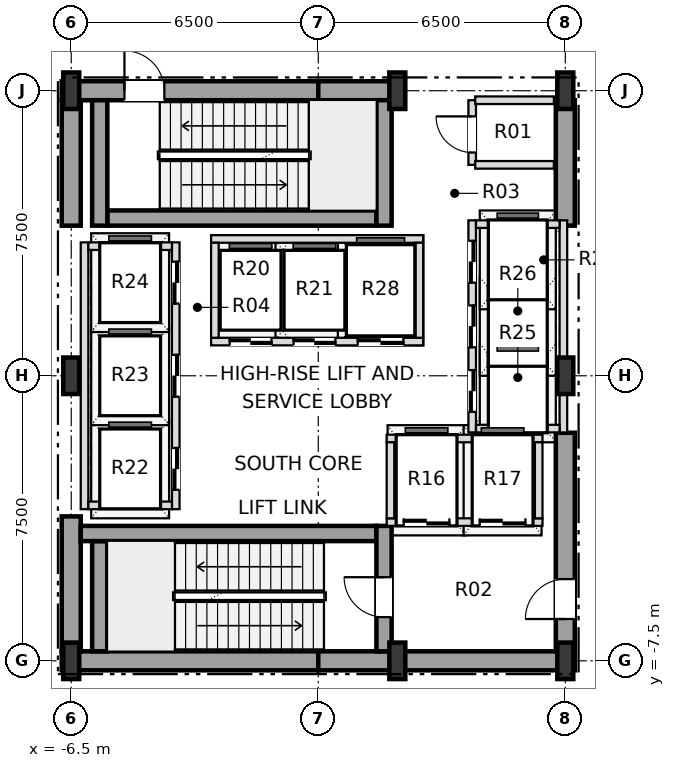
"""IFC4 building model, lengths in metres.
Left out: names, types, materials, properties, quantities, classifications, styles, units other than length and angle.
Written with IfcOpenShell. Run it as: python <this file> out.ifc"""

import sys

from ifc_helpers import new_model, si_unit, direction, frame, frame_2d, origin, origin_2d, place, context, subcontext, project, spatial, rectangle, i_section, extrude, element, fill, save


model = new_model("IFC4")
c1 = context("Model", 3, precision=1e-05, world=origin(), true_north=direction((0.0, 1.0)))
c2 = subcontext(c1, "Body", "Model", "MODEL_VIEW")
j1 = project(units=[si_unit("LENGTHUNIT", "METRE"), si_unit("PLANEANGLEUNIT", "RADIAN")], contexts=[c1])
p1 = place(None, origin())
s1 = spatial("IfcSite", under=j1, at=p1, CompositionType="ELEMENT")
p2 = place(p1, origin())
s2 = spatial("IfcBuilding", under=s1, at=p2, CompositionType="ELEMENT")
p3 = place(p2, frame((0.0, 0.0, 6.0)))
s3 = spatial("IfcBuildingStorey", under=s2, at=p3, CompositionType="ELEMENT", Elevation=6.0)
for number, where, z_axis, x_axis in (
    (1, (-6.5, -7.5, 0.0), (0.0, 0.0, 1.0), (1.0, 0.0, 0.0)),
    (2, (2.08, -7.5, 0.0), (0.0, 0.0, 1.0), (1.0, 0.0, 0.0)),
    (3, (6.5, -7.5, 0.0), (0.0, 0.0, 1.0), (1.0, 0.0, 0.0)),
    (4, (-6.5, 0.0, 0.0), (0.0, 0.0, 1.0), (1.0, 0.0, 0.0)),
    (5, (6.5, 0.0, 0.0), (0.0, 0.0, 1.0), (1.0, 0.0, 0.0)),
    (6, (-6.5, 7.5, 0.0), (0.0, 0.0, 1.0), (1.0, 0.0, 0.0)),
    (7, (2.08, 7.5, 0.0), (0.0, 0.0, 1.0), (1.0, 0.0, 0.0)),
    (8, (6.5, 7.5, 0.0), (0.0, 0.0, 1.0), (1.0, 0.0, 0.0)),
):
    element("IfcColumn", number, at=place(p3, frame(where, z_axis=z_axis, x_axis=x_axis)), inside=s3, PredefinedType="COLUMN", context=c2, shape_type="SweptSolid", body=[
        extrude(i_section(OverallWidth=0.42, OverallDepth=0.96, WebThickness=0.022, FlangeThickness=0.034, at=origin_2d()), origin(), (0.0, 0.0, 1.0), 5.4),
    ])
for number, where, z_axis, x_axis in (
    (9, (-6.75, -7.5, 0.0), (0.0, 0.0, 1.0), (1.0, 0.0, 0.0)),
    (10, (0.0, -7.5, 0.0), (0.0, 0.0, 1.0), (1.0, 0.0, 0.0)),
):
    element("IfcWall", number, at=place(p3, frame(where, z_axis=z_axis, x_axis=x_axis)), inside=s3, PredefinedType="SHEAR", context=c2, shape_type="SweptSolid", body=[
        extrude(rectangle(XDim=6.75, YDim=0.5, at=frame_2d((3.375, 0.0))), origin(), (0.0, 0.0, 1.0), 5.12),
    ])
p4 = place(p3, frame((-6.75, 7.5, 0.0), z_axis=(0.0, 0.0, 1.0), x_axis=(1.0, 0.0, 0.0)))
e11 = element("IfcWall", 11, at=p4, inside=s3, PredefinedType="SHEAR", context=c2, shape_type="SweptSolid", body=[
    extrude(rectangle(XDim=6.75, YDim=0.5, at=frame_2d((3.375, 0.0))), origin(), (0.0, 0.0, 1.0), 5.12),
])
p5 = place(p4, frame((1.65, 0.0, 0.0)))
e12 = element("IfcOpeningElement", 12, at=p5, cuts=e11, PredefinedType="OPENING", context=c2, shape_type="SweptSolid", body=[
    extrude(rectangle(XDim=1.05, YDim=2.15, at=frame_2d((0.525, 1.075))), frame((0.0, 0.26, 0.0), z_axis=(0.0, -1.0, 0.0), x_axis=(1.0, 0.0, 0.0)), (0.0, 0.0, 1.0), 0.52),
])
p6 = place(p3, frame((0.0, 7.5, 0.0), z_axis=(0.0, 0.0, 1.0), x_axis=(1.0, 0.0, 0.0)))
e13 = element("IfcWall", 13, at=p6, inside=s3, PredefinedType="SHEAR", context=c2, shape_type="SweptSolid", body=[
    extrude(rectangle(XDim=2.08, YDim=0.5, at=frame_2d((1.04, 0.0))), origin(), (0.0, 0.0, 1.0), 5.12),
])
p7 = place(p3, frame((-6.5, -7.25, 0.0), z_axis=(0.0, 0.0, 1.0), x_axis=(0.0, 1.0, 0.0)))
e14 = element("IfcWall", 14, at=p7, inside=s3, PredefinedType="SHEAR", context=c2, shape_type="SweptSolid", body=[
    extrude(rectangle(XDim=3.55, YDim=0.5, at=frame_2d((1.775, 0.0))), origin(), (0.0, 0.0, 1.0), 5.12),
])
p8 = place(p3, frame((-6.5, 3.95, 0.0), z_axis=(0.0, 0.0, 1.0), x_axis=(0.0, 1.0, 0.0)))
e15 = element("IfcWall", 15, at=p8, inside=s3, PredefinedType="SHEAR", context=c2, shape_type="SweptSolid", body=[
    extrude(rectangle(XDim=3.3, YDim=0.5, at=frame_2d((1.65, 0.0))), origin(), (0.0, 0.0, 1.0), 5.12),
])
p9 = place(p3, frame((6.5, -7.25, 0.0), z_axis=(0.0, 0.0, 1.0), x_axis=(0.0, 1.0, 0.0)))
e16 = element("IfcWall", 16, at=p9, inside=s3, PredefinedType="SHEAR", context=c2, shape_type="SweptSolid", body=[
    extrude(rectangle(XDim=5.75, YDim=0.5, at=frame_2d((2.875, 0.0))), origin(), (0.0, 0.0, 1.0), 5.12),
])
p10 = place(p9, frame((0.85, 0.0, 0.0)))
e17 = element("IfcOpeningElement", 17, at=p10, cuts=e16, PredefinedType="OPENING", context=c2, shape_type="SweptSolid", body=[
    extrude(rectangle(XDim=1.05, YDim=2.15, at=frame_2d((0.525, 1.075))), frame((0.0, 0.26, 0.0), z_axis=(0.0, -1.0, 0.0), x_axis=(1.0, 0.0, 0.0)), (0.0, 0.0, 1.0), 0.52),
])
p11 = place(p3, frame((6.5, 3.95, 0.0), z_axis=(0.0, 0.0, 1.0), x_axis=(0.0, 1.0, 0.0)))
e18 = element("IfcWall", 18, at=p11, inside=s3, PredefinedType="SHEAR", context=c2, shape_type="SweptSolid", body=[
    extrude(rectangle(XDim=3.3, YDim=0.5, at=frame_2d((1.65, 0.0))), origin(), (0.0, 0.0, 1.0), 5.12),
])
p12 = place(p3, frame((-5.75, -7.25, 0.0), z_axis=(0.0, 0.0, 1.0), x_axis=(0.0, 1.0, 0.0)))
e19 = element("IfcWall", 19, at=p12, inside=s3, PredefinedType="SHEAR", context=c2, shape_type="SweptSolid", body=[
    extrude(rectangle(XDim=2.9, YDim=0.4, at=frame_2d((1.45, 0.0))), origin(), (0.0, 0.0, 1.0), 5.12),
])
p13 = place(p3, frame((-6.25, -4.15, 0.0), z_axis=(0.0, 0.0, 1.0), x_axis=(1.0, 0.0, 0.0)))
e20 = element("IfcWall", 20, at=p13, inside=s3, PredefinedType="SHEAR", context=c2, shape_type="SweptSolid", body=[
    extrude(rectangle(XDim=7.78, YDim=0.4, at=frame_2d((3.89, 0.0))), origin(), (0.0, 0.0, 1.0), 5.12),
])
p14 = place(p3, frame((1.73, -7.25, 0.0), z_axis=(0.0, 0.0, 1.0), x_axis=(0.0, 1.0, 0.0)))
e21 = element("IfcWall", 21, at=p14, inside=s3, PredefinedType="SHEAR", context=c2, shape_type="SweptSolid", body=[
    extrude(rectangle(XDim=3.3, YDim=0.4, at=frame_2d((1.65, 0.0))), origin(), (0.0, 0.0, 1.0), 5.12),
])
p15 = place(p14, frame((0.9, 0.0, 0.0)))
e22 = element("IfcOpeningElement", 22, at=p15, cuts=e21, PredefinedType="OPENING", context=c2, shape_type="SweptSolid", body=[
    extrude(rectangle(XDim=1.05, YDim=2.15, at=frame_2d((0.525, 1.075))), frame((0.0, 0.21, 0.0), z_axis=(0.0, -1.0, 0.0), x_axis=(1.0, 0.0, 0.0)), (0.0, 0.0, 1.0), 0.42),
])
p16 = place(p3, frame((-5.55, 4.15, 0.0), z_axis=(0.0, 0.0, 1.0), x_axis=(1.0, 0.0, 0.0)))
e23 = element("IfcWall", 23, at=p16, inside=s3, PredefinedType="SHEAR", context=c2, shape_type="SweptSolid", body=[
    extrude(rectangle(XDim=7.08, YDim=0.4, at=frame_2d((3.54, 0.0))), origin(), (0.0, 0.0, 1.0), 5.12),
])
for number, where, z_axis, x_axis in (
    (24, (1.73, 3.95, 0.0), (0.0, 0.0, 1.0), (0.0, 1.0, 0.0)),
    (25, (-5.75, 3.95, 0.0), (0.0, 0.0, 1.0), (0.0, 1.0, 0.0)),
):
    element("IfcWall", number, at=place(p3, frame(where, z_axis=z_axis, x_axis=x_axis)), inside=s3, PredefinedType="SHEAR", context=c2, shape_type="SweptSolid", body=[
        extrude(rectangle(XDim=3.3, YDim=0.4, at=frame_2d((1.65, 0.0))), origin(), (0.0, 0.0, 1.0), 5.12),
    ])
p17 = place(p3, frame((-3.75, -3.51, 0.0), z_axis=(0.0, 0.0, 1.0), x_axis=(0.0, 1.0, 0.0)))
e26 = element("IfcWall", 26, at=p17, inside=s3, PredefinedType="SOLIDWALL", context=c2, shape_type="SweptSolid", body=[
    extrude(rectangle(XDim=7.02, YDim=0.2, at=frame_2d((3.51, 0.0))), origin(), (0.0, 0.0, 1.0), 5.12),
])
p18 = place(p17, frame((0.51, 0.0, 0.0)))
e27 = element("IfcOpeningElement", 27, at=p18, cuts=e26, PredefinedType="OPENING", context=c2, shape_type="SweptSolid", body=[
    extrude(rectangle(XDim=1.1, YDim=2.15, at=frame_2d((0.55, 1.075))), frame((0.0, 0.11, 0.0), z_axis=(0.0, -1.0, 0.0), x_axis=(1.0, 0.0, 0.0)), (0.0, 0.0, 1.0), 0.22),
])
p19 = place(p17, frame((2.96, 0.0, 0.0)))
e28 = element("IfcOpeningElement", 28, at=p19, cuts=e26, PredefinedType="OPENING", context=c2, shape_type="SweptSolid", body=[
    extrude(rectangle(XDim=1.1, YDim=2.15, at=frame_2d((0.55, 1.075))), frame((0.0, 0.11, 0.0), z_axis=(0.0, -1.0, 0.0), x_axis=(1.0, 0.0, 0.0)), (0.0, 0.0, 1.0), 0.22),
])
p20 = place(p17, frame((5.41, 0.0, 0.0)))
e29 = element("IfcOpeningElement", 29, at=p20, cuts=e26, PredefinedType="OPENING", context=c2, shape_type="SweptSolid", body=[
    extrude(rectangle(XDim=1.1, YDim=2.15, at=frame_2d((0.55, 1.075))), frame((0.0, 0.11, 0.0), z_axis=(0.0, -1.0, 0.0), x_axis=(1.0, 0.0, 0.0)), (0.0, 0.0, 1.0), 0.22),
])
p21 = place(p3, frame((-6.15, -3.51, 0.0), z_axis=(0.0, 0.0, 1.0), x_axis=(0.0, 1.0, 0.0)))
e30 = element("IfcWall", 30, at=p21, inside=s3, PredefinedType="SOLIDWALL", context=c2, shape_type="SweptSolid", body=[
    extrude(rectangle(XDim=7.02, YDim=0.2, at=frame_2d((3.51, 0.0))), origin(), (0.0, 0.0, 1.0), 5.12),
])
for number, where, z_axis, x_axis in (
    (31, (-6.05, -3.41, 0.0), (0.0, 0.0, 1.0), (1.0, 0.0, 0.0)),
    (32, (-6.05, 3.41, 0.0), (0.0, 0.0, 1.0), (1.0, 0.0, 0.0)),
):
    element("IfcWall", number, at=place(p3, frame(where, z_axis=z_axis, x_axis=x_axis)), inside=s3, PredefinedType="SOLIDWALL", context=c2, shape_type="SweptSolid", body=[
        extrude(rectangle(XDim=2.2, YDim=0.2, at=frame_2d((1.1, 0.0))), origin(), (0.0, 0.0, 1.0), 5.12),
    ])
p22 = place(p3, frame((4.05, -1.49, 0.0), z_axis=(0.0, 0.0, 1.0), x_axis=(0.0, 1.0, 0.0)))
e33 = element("IfcWall", 33, at=p22, inside=s3, PredefinedType="SOLIDWALL", context=c2, shape_type="SweptSolid", body=[
    extrude(rectangle(XDim=5.58, YDim=0.2, at=frame_2d((2.79, 0.0))), origin(), (0.0, 0.0, 1.0), 5.12),
])
p23 = place(p22, frame((0.54, 0.0, 0.0)))
e34 = element("IfcOpeningElement", 34, at=p23, cuts=e33, PredefinedType="OPENING", context=c2, shape_type="SweptSolid", body=[
    extrude(rectangle(XDim=1.1, YDim=2.15, at=frame_2d((0.55, 1.075))), frame((0.0, 0.11, 0.0), z_axis=(0.0, -1.0, 0.0), x_axis=(1.0, 0.0, 0.0)), (0.0, 0.0, 1.0), 0.22),
])
p24 = place(p22, frame((2.24, 0.0, 0.0)))
e35 = element("IfcOpeningElement", 35, at=p24, cuts=e33, PredefinedType="OPENING", context=c2, shape_type="SweptSolid", body=[
    extrude(rectangle(XDim=1.1, YDim=2.15, at=frame_2d((0.55, 1.075))), frame((0.0, 0.11, 0.0), z_axis=(0.0, -1.0, 0.0), x_axis=(1.0, 0.0, 0.0)), (0.0, 0.0, 1.0), 0.22),
])
p25 = place(p22, frame((3.94, 0.0, 0.0)))
e36 = element("IfcOpeningElement", 36, at=p25, cuts=e33, PredefinedType="OPENING", context=c2, shape_type="SweptSolid", body=[
    extrude(rectangle(XDim=1.1, YDim=2.15, at=frame_2d((0.55, 1.075))), frame((0.0, 0.11, 0.0), z_axis=(0.0, -1.0, 0.0), x_axis=(1.0, 0.0, 0.0)), (0.0, 0.0, 1.0), 0.22),
])
p26 = place(p3, frame((6.45, -1.49, 0.0), z_axis=(0.0, 0.0, 1.0), x_axis=(0.0, 1.0, 0.0)))
e37 = element("IfcWall", 37, at=p26, inside=s3, PredefinedType="SOLIDWALL", context=c2, shape_type="SweptSolid", body=[
    extrude(rectangle(XDim=5.58, YDim=0.2, at=frame_2d((2.79, 0.0))), origin(), (0.0, 0.0, 1.0), 4.41),
])
for number, where, z_axis, x_axis in (
    (38, (4.15, -1.39, 0.0), (0.0, 0.0, 1.0), (1.0, 0.0, 0.0)),
    (39, (4.15, 3.99, 0.0), (0.0, 0.0, 1.0), (1.0, 0.0, 0.0)),
):
    element("IfcWall", number, at=place(p3, frame(where, z_axis=z_axis, x_axis=x_axis)), inside=s3, PredefinedType="SOLIDWALL", context=c2, shape_type="SweptSolid", body=[
        extrude(rectangle(XDim=2.2, YDim=0.2, at=frame_2d((1.1, 0.0))), origin(), (0.0, 0.0, 1.0), 5.12),
    ])
p27 = place(p3, frame((-2.82, 0.9, 0.0), z_axis=(0.0, 0.0, 1.0), x_axis=(1.0, 0.0, 0.0)))
e40 = element("IfcWall", 40, at=p27, inside=s3, PredefinedType="SOLIDWALL", context=c2, shape_type="SweptSolid", body=[
    extrude(rectangle(XDim=5.58, YDim=0.2, at=frame_2d((2.79, 0.0))), origin(), (0.0, 0.0, 1.0), 5.12),
])
p28 = place(p27, frame((0.49, 0.0, 0.0)))
e41 = element("IfcOpeningElement", 41, at=p28, cuts=e40, PredefinedType="OPENING", context=c2, shape_type="SweptSolid", body=[
    extrude(rectangle(XDim=1.1, YDim=2.15, at=frame_2d((0.55, 1.075))), frame((0.0, 0.11, 0.0), z_axis=(0.0, -1.0, 0.0), x_axis=(1.0, 0.0, 0.0)), (0.0, 0.0, 1.0), 0.22),
])
p29 = place(p27, frame((2.17, 0.0, 0.0)))
e42 = element("IfcOpeningElement", 42, at=p29, cuts=e40, PredefinedType="OPENING", context=c2, shape_type="SweptSolid", body=[
    extrude(rectangle(XDim=1.1, YDim=2.15, at=frame_2d((0.55, 1.075))), frame((0.0, 0.11, 0.0), z_axis=(0.0, -1.0, 0.0), x_axis=(1.0, 0.0, 0.0)), (0.0, 0.0, 1.0), 0.22),
])
p30 = place(p27, frame((3.86, 0.0, 0.0)))
e43 = element("IfcOpeningElement", 43, at=p30, cuts=e40, PredefinedType="OPENING", context=c2, shape_type="SweptSolid", body=[
    extrude(rectangle(XDim=1.2, YDim=2.2, at=frame_2d((0.6, 1.1))), frame((0.0, 0.11, 0.0), z_axis=(0.0, -1.0, 0.0), x_axis=(1.0, 0.0, 0.0)), (0.0, 0.0, 1.0), 0.22),
])
p31 = place(p3, frame((-2.82, 3.6, 0.0), z_axis=(0.0, 0.0, 1.0), x_axis=(1.0, 0.0, 0.0)))
e44 = element("IfcWall", 44, at=p31, inside=s3, PredefinedType="SOLIDWALL", context=c2, shape_type="SweptSolid", body=[
    extrude(rectangle(XDim=5.58, YDim=0.2, at=frame_2d((2.79, 0.0))), origin(), (0.0, 0.0, 1.0), 5.12),
])
for number, where, z_axis, x_axis in (
    (45, (-2.72, 1.0, 0.0), (0.0, 0.0, 1.0), (0.0, 1.0, 0.0)),
    (46, (2.66, 1.0, 0.0), (0.0, 0.0, 1.0), (0.0, 1.0, 0.0)),
):
    element("IfcWall", number, at=place(p3, frame(where, z_axis=z_axis, x_axis=x_axis)), inside=s3, PredefinedType="SOLIDWALL", context=c2, shape_type="SweptSolid", body=[
        extrude(rectangle(XDim=2.5, YDim=0.2, at=frame_2d((1.25, 0.0))), origin(), (0.0, 0.0, 1.0), 5.12),
    ])
p32 = place(p3, frame((1.8, -3.85, 0.0), z_axis=(0.0, 0.0, 1.0), x_axis=(1.0, 0.0, 0.0)))
e47 = element("IfcWall", 47, at=p32, inside=s3, PredefinedType="SOLIDWALL", context=c2, shape_type="SweptSolid", body=[
    extrude(rectangle(XDim=4.1, YDim=0.2, at=frame_2d((2.05, 0.0))), origin(), (0.0, 0.0, 1.0), 5.12),
])
p33 = place(p32, frame((0.45, 0.0, 0.0)))
e48 = element("IfcOpeningElement", 48, at=p33, cuts=e47, PredefinedType="OPENING", context=c2, shape_type="SweptSolid", body=[
    extrude(rectangle(XDim=1.2, YDim=2.2, at=frame_2d((0.6, 1.1))), frame((0.0, 0.11, 0.0), z_axis=(0.0, -1.0, 0.0), x_axis=(1.0, 0.0, 0.0)), (0.0, 0.0, 1.0), 0.22),
])
p34 = place(p32, frame((2.45, 0.0, 0.0)))
e49 = element("IfcOpeningElement", 49, at=p34, cuts=e47, PredefinedType="OPENING", context=c2, shape_type="SweptSolid", body=[
    extrude(rectangle(XDim=1.2, YDim=2.2, at=frame_2d((0.6, 1.1))), frame((0.0, 0.11, 0.0), z_axis=(0.0, -1.0, 0.0), x_axis=(1.0, 0.0, 0.0)), (0.0, 0.0, 1.0), 0.22),
])
p35 = place(p3, frame((1.8, -1.65, 0.0), z_axis=(0.0, 0.0, 1.0), x_axis=(1.0, 0.0, 0.0)))
e50 = element("IfcWall", 50, at=p35, inside=s3, PredefinedType="SOLIDWALL", context=c2, shape_type="SweptSolid", body=[
    extrude(rectangle(XDim=4.1, YDim=0.2, at=frame_2d((2.05, 0.0))), origin(), (0.0, 0.0, 1.0), 5.12),
])
for number, where, z_axis, x_axis in (
    (51, (1.9, -3.75, 0.0), (0.0, 0.0, 1.0), (0.0, 1.0, 0.0)),
    (52, (5.8, -3.75, 0.0), (0.0, 0.0, 1.0), (0.0, 1.0, 0.0)),
):
    element("IfcWall", number, at=place(p3, frame(where, z_axis=z_axis, x_axis=x_axis)), inside=s3, PredefinedType="SOLIDWALL", context=c2, shape_type="SweptSolid", body=[
        extrude(rectangle(XDim=2.0, YDim=0.2, at=frame_2d((1.0, 0.0))), origin(), (0.0, 0.0, 1.0), 5.12),
    ])
p36 = place(p3, frame((4.05, 5.55, 0.0), z_axis=(0.0, 0.0, 1.0), x_axis=(0.0, 1.0, 0.0)))
e53 = element("IfcWall", 53, at=p36, inside=s3, PredefinedType="SOLIDWALL", context=c2, shape_type="SweptSolid", body=[
    extrude(rectangle(XDim=1.7, YDim=0.2, at=frame_2d((0.85, 0.0))), origin(), (0.0, 0.0, 1.0), 5.12),
])
p37 = place(p36, frame((0.325, 0.0, 0.0)))
e54 = element("IfcOpeningElement", 54, at=p37, cuts=e53, PredefinedType="OPENING", context=c2, shape_type="SweptSolid", body=[
    extrude(rectangle(XDim=0.95, YDim=2.15, at=frame_2d((0.475, 1.075))), frame((0.0, 0.11, 0.0), z_axis=(0.0, -1.0, 0.0), x_axis=(1.0, 0.0, 0.0)), (0.0, 0.0, 1.0), 0.22),
])
p38 = place(p3, frame((4.13, 5.55, 0.0), z_axis=(0.0, 0.0, 1.0), x_axis=(1.0, 0.0, 0.0)))
e55 = element("IfcWall", 55, at=p38, inside=s3, PredefinedType="SOLIDWALL", context=c2, shape_type="SweptSolid", body=[
    extrude(rectangle(XDim=2.07, YDim=0.2, at=frame_2d((1.035, 0.0))), origin(), (0.0, 0.0, 1.0), 5.12),
])
p39 = place(p3, frame((4.13, 7.25, 0.0), z_axis=(0.0, 0.0, 1.0), x_axis=(1.0, 0.0, 0.0)))
e56 = element("IfcWall", 56, at=p39, inside=s3, PredefinedType="SOLIDWALL", context=c2, shape_type="SweptSolid", body=[
    extrude(rectangle(XDim=2.07, YDim=0.2, at=frame_2d((1.035, 0.0))), origin(), (0.0, 0.0, 1.0), 4.41),
])
p40 = place(p10, origin())
e57 = element("IfcDoor", 57, at=p40, inside=s3, OperationType="SINGLE_SWING_LEFT", PredefinedType="DOOR", context=c2, shape_type="SweptSolid", body=[
    extrude(rectangle(XDim=1.05, YDim=2.15, at=frame_2d((0.525, 1.075))), frame((0.0, 0.025, 0.0), z_axis=(0.0, -1.0, 0.0), x_axis=(1.0, 0.0, 0.0)), (0.0, 0.0, 1.0), 0.05),
])
fill(e17, e57)
p41 = place(p15, origin())
e58 = element("IfcDoor", 58, at=p41, inside=s3, OperationType="SINGLE_SWING_RIGHT", PredefinedType="DOOR", context=c2, shape_type="SweptSolid", body=[
    extrude(rectangle(XDim=1.05, YDim=2.15, at=frame_2d((0.525, 1.075))), frame((0.0, 0.025, 0.0), z_axis=(0.0, -1.0, 0.0), x_axis=(1.0, 0.0, 0.0)), (0.0, 0.0, 1.0), 0.05),
])
fill(e22, e58)
p42 = place(p5, origin())
e59 = element("IfcDoor", 59, at=p42, inside=s3, OperationType="SINGLE_SWING_LEFT", PredefinedType="DOOR", context=c2, shape_type="SweptSolid", body=[
    extrude(rectangle(XDim=1.05, YDim=2.15, at=frame_2d((0.525, 1.075))), frame((0.0, 0.025, 0.0), z_axis=(0.0, -1.0, 0.0), x_axis=(1.0, 0.0, 0.0)), (0.0, 0.0, 1.0), 0.05),
])
fill(e12, e59)
p43 = place(p18, origin())
e60 = element("IfcDoor", 60, at=p43, inside=s3, OperationType="DOUBLE_DOOR_SLIDING", PredefinedType="DOOR", context=c2, shape_type="SweptSolid", body=[
    extrude(rectangle(XDim=1.1, YDim=2.15, at=frame_2d((0.55, 1.075))), frame((0.0, 0.025, 0.0), z_axis=(0.0, -1.0, 0.0), x_axis=(1.0, 0.0, 0.0)), (0.0, 0.0, 1.0), 0.05),
])
fill(e27, e60)
p44 = place(p19, origin())
e61 = element("IfcDoor", 61, at=p44, inside=s3, OperationType="DOUBLE_DOOR_SLIDING", PredefinedType="DOOR", context=c2, shape_type="SweptSolid", body=[
    extrude(rectangle(XDim=1.1, YDim=2.15, at=frame_2d((0.55, 1.075))), frame((0.0, 0.025, 0.0), z_axis=(0.0, -1.0, 0.0), x_axis=(1.0, 0.0, 0.0)), (0.0, 0.0, 1.0), 0.05),
])
fill(e28, e61)
p45 = place(p20, origin())
e62 = element("IfcDoor", 62, at=p45, inside=s3, OperationType="DOUBLE_DOOR_SLIDING", PredefinedType="DOOR", context=c2, shape_type="SweptSolid", body=[
    extrude(rectangle(XDim=1.1, YDim=2.15, at=frame_2d((0.55, 1.075))), frame((0.0, 0.025, 0.0), z_axis=(0.0, -1.0, 0.0), x_axis=(1.0, 0.0, 0.0)), (0.0, 0.0, 1.0), 0.05),
])
fill(e29, e62)
p46 = place(p23, origin())
e63 = element("IfcDoor", 63, at=p46, inside=s3, OperationType="DOUBLE_DOOR_SLIDING", PredefinedType="DOOR", context=c2, shape_type="SweptSolid", body=[
    extrude(rectangle(XDim=1.1, YDim=2.15, at=frame_2d((0.55, 1.075))), frame((0.0, 0.025, 0.0), z_axis=(0.0, -1.0, 0.0), x_axis=(1.0, 0.0, 0.0)), (0.0, 0.0, 1.0), 0.05),
])
fill(e34, e63)
p47 = place(p24, origin())
e64 = element("IfcDoor", 64, at=p47, inside=s3, OperationType="DOUBLE_DOOR_SLIDING", PredefinedType="DOOR", context=c2, shape_type="SweptSolid", body=[
    extrude(rectangle(XDim=1.1, YDim=2.15, at=frame_2d((0.55, 1.075))), frame((0.0, 0.025, 0.0), z_axis=(0.0, -1.0, 0.0), x_axis=(1.0, 0.0, 0.0)), (0.0, 0.0, 1.0), 0.05),
])
fill(e35, e64)
p48 = place(p25, origin())
e65 = element("IfcDoor", 65, at=p48, inside=s3, OperationType="DOUBLE_DOOR_SLIDING", PredefinedType="DOOR", context=c2, shape_type="SweptSolid", body=[
    extrude(rectangle(XDim=1.1, YDim=2.15, at=frame_2d((0.55, 1.075))), frame((0.0, 0.025, 0.0), z_axis=(0.0, -1.0, 0.0), x_axis=(1.0, 0.0, 0.0)), (0.0, 0.0, 1.0), 0.05),
])
fill(e36, e65)
p49 = place(p28, origin())
e66 = element("IfcDoor", 66, at=p49, inside=s3, OperationType="DOUBLE_DOOR_SLIDING", PredefinedType="DOOR", context=c2, shape_type="SweptSolid", body=[
    extrude(rectangle(XDim=1.1, YDim=2.15, at=frame_2d((0.55, 1.075))), frame((0.0, 0.025, 0.0), z_axis=(0.0, -1.0, 0.0), x_axis=(1.0, 0.0, 0.0)), (0.0, 0.0, 1.0), 0.05),
])
fill(e41, e66)
p50 = place(p29, origin())
e67 = element("IfcDoor", 67, at=p50, inside=s3, OperationType="DOUBLE_DOOR_SLIDING", PredefinedType="DOOR", context=c2, shape_type="SweptSolid", body=[
    extrude(rectangle(XDim=1.1, YDim=2.15, at=frame_2d((0.55, 1.075))), frame((0.0, 0.025, 0.0), z_axis=(0.0, -1.0, 0.0), x_axis=(1.0, 0.0, 0.0)), (0.0, 0.0, 1.0), 0.05),
])
fill(e42, e67)
p51 = place(p30, origin())
e68 = element("IfcDoor", 68, at=p51, inside=s3, OperationType="DOUBLE_DOOR_SLIDING", PredefinedType="DOOR", context=c2, shape_type="SweptSolid", body=[
    extrude(rectangle(XDim=1.2, YDim=2.2, at=frame_2d((0.6, 1.1))), frame((0.0, 0.025, 0.0), z_axis=(0.0, -1.0, 0.0), x_axis=(1.0, 0.0, 0.0)), (0.0, 0.0, 1.0), 0.05),
])
fill(e43, e68)
p52 = place(p33, origin())
e69 = element("IfcDoor", 69, at=p52, inside=s3, OperationType="DOUBLE_DOOR_SLIDING", PredefinedType="DOOR", context=c2, shape_type="SweptSolid", body=[
    extrude(rectangle(XDim=1.2, YDim=2.2, at=frame_2d((0.6, 1.1))), frame((0.0, 0.025, 0.0), z_axis=(0.0, -1.0, 0.0), x_axis=(1.0, 0.0, 0.0)), (0.0, 0.0, 1.0), 0.05),
])
fill(e48, e69)
p53 = place(p34, origin())
e70 = element("IfcDoor", 70, at=p53, inside=s3, OperationType="DOUBLE_DOOR_SLIDING", PredefinedType="DOOR", context=c2, shape_type="SweptSolid", body=[
    extrude(rectangle(XDim=1.2, YDim=2.2, at=frame_2d((0.6, 1.1))), frame((0.0, 0.025, 0.0), z_axis=(0.0, -1.0, 0.0), x_axis=(1.0, 0.0, 0.0)), (0.0, 0.0, 1.0), 0.05),
])
fill(e49, e70)
p54 = place(p37, origin())
e71 = element("IfcDoor", 71, at=p54, inside=s3, OperationType="SINGLE_SWING_RIGHT", PredefinedType="DOOR", context=c2, shape_type="SweptSolid", body=[
    extrude(rectangle(XDim=0.95, YDim=2.15, at=frame_2d((0.475, 1.075))), frame((0.0, 0.025, 0.0), z_axis=(0.0, -1.0, 0.0), x_axis=(1.0, 0.0, 0.0)), (0.0, 0.0, 1.0), 0.05),
])
fill(e54, e71)
save(model, sys.argv[1])
